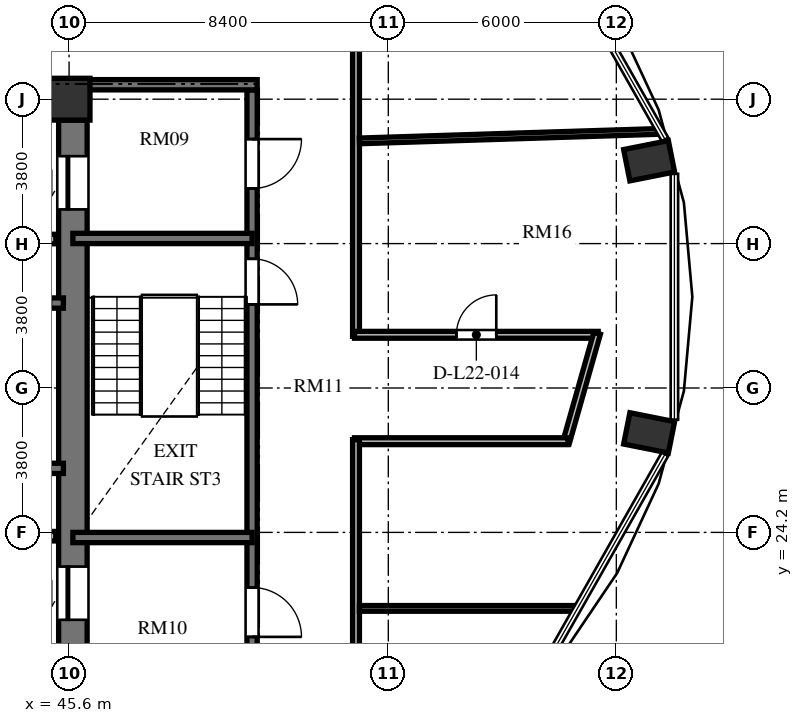
"""IFC4 building model, lengths in metres.
Left out: names, types, materials, properties, quantities, classifications, styles, units other than length and angle.
Written with IfcOpenShell. Run it as: python <this file> out.ifc"""

import sys

from ifc_helpers import new_model, si_unit, direction, frame, frame_2d, origin, origin_2d, place, context, subcontext, project, spatial, rectangle, extrude, element, fill, save


model = new_model("IFC4")
c1 = context("Model", 3, precision=1e-05, world=origin(), true_north=direction((0.0, 1.0)))
c2 = subcontext(c1, "Body", "Model", "MODEL_VIEW")
j1 = project(units=[si_unit("LENGTHUNIT", "METRE"), si_unit("PLANEANGLEUNIT", "RADIAN")], contexts=[c1])
p1 = place(None, origin())
s1 = spatial("IfcSite", under=j1, at=p1, CompositionType="ELEMENT")
p2 = place(p1, origin())
s2 = spatial("IfcBuilding", under=s1, at=p2, CompositionType="ELEMENT")
p3 = place(p2, frame((0.0, 0.0, 89.04)))
s3 = spatial("IfcBuildingStorey", under=s2, at=p3, CompositionType="ELEMENT", Elevation=89.04)
for number, where, z_axis, x_axis in (
    (1, (60.863, 26.82, 0.0), (0.0, 0.0, 1.0), (0.981, -0.195, 0.0)),
    (2, (60.863, 33.98, 0.0), (0.0, 0.0, 1.0), (0.981, 0.195, 0.0)),
):
    element("IfcColumn", number, at=place(p3, frame(where, z_axis=z_axis, x_axis=x_axis)), inside=s3, PredefinedType="COLUMN", context=c2, shape_type="SweptSolid", body=[
        extrude(rectangle(XDim=1.2, YDim=0.84, at=origin_2d()), origin(), (0.0, 0.0, 1.0), 3.648),
    ])
p4 = place(p3, frame((45.6, 35.6, 0.0), z_axis=(0.0, 0.0, 1.0), x_axis=(1.0, 0.0, 0.0)))
e3 = element("IfcColumn", 3, at=p4, inside=s3, PredefinedType="COLUMN", context=c2, shape_type="SweptSolid", body=[
    extrude(rectangle(XDim=1.1, YDim=1.1, at=origin_2d()), origin(), (0.0, 0.0, 1.0), 3.648),
])
p5 = place(p3, frame((45.7, 20.95, 0.0), z_axis=(0.0, 0.0, 1.0), x_axis=(0.0, 1.0, 0.0)))
e4 = element("IfcWall", 4, at=p5, inside=s3, PredefinedType="SHEAR", context=c2, shape_type="SweptSolid", body=[
    extrude(rectangle(XDim=14.1, YDim=0.75, at=frame_2d((7.05, 0.0))), origin(), (0.0, 0.0, 1.0), 3.648),
])
p6 = place(p5, frame((11.75, 0.0, 0.0)))
e5 = element("IfcOpeningElement", 5, at=p6, cuts=e4, PredefinedType="OPENING", context=c2, shape_type="SweptSolid", body=[
    extrude(rectangle(XDim=1.4, YDim=2.3, at=frame_2d((0.7, 1.15))), frame((0.0, 0.385, 0.0), z_axis=(0.0, -1.0, 0.0), x_axis=(1.0, 0.0, 0.0)), (0.0, 0.0, 1.0), 0.77),
])
p7 = place(p5, frame((0.95, 0.0, 0.0)))
e6 = element("IfcOpeningElement", 6, at=p7, cuts=e4, PredefinedType="OPENING", context=c2, shape_type="SweptSolid", body=[
    extrude(rectangle(XDim=1.4, YDim=2.3, at=frame_2d((0.7, 1.15))), frame((0.0, 0.385, 0.0), z_axis=(0.0, -1.0, 0.0), x_axis=(1.0, 0.0, 0.0)), (0.0, 0.0, 1.0), 0.77),
])
p8 = place(p3, frame((37.465, 30.235, 0.0), z_axis=(0.0, 0.0, 1.0), x_axis=(1.0, 0.0, 0.0)))
e7 = element("IfcWall", 7, at=p8, inside=s3, PredefinedType="SHEAR", context=c2, shape_type="SweptSolid", body=[
    extrude(rectangle(XDim=7.985, YDim=0.27, at=frame_2d((3.992, 0.0))), origin(), (0.0, 0.0, 1.0), 3.648),
])
p9 = place(p8, frame((6.455, 0.0, 0.0)))
e8 = element("IfcOpeningElement", 8, at=p9, cuts=e7, PredefinedType="OPENING", context=c2, shape_type="SweptSolid", body=[
    extrude(rectangle(XDim=1.2, YDim=2.15, at=frame_2d((0.6, 1.075))), frame((0.0, 0.145, 0.0), z_axis=(0.0, -1.0, 0.0), x_axis=(1.0, 0.0, 0.0)), (0.0, 0.0, 1.0), 0.29),
])
p10 = place(p3, frame((37.465, 25.885, 0.0), z_axis=(0.0, 0.0, 1.0), x_axis=(1.0, 0.0, 0.0)))
e9 = element("IfcWall", 9, at=p10, inside=s3, PredefinedType="SHEAR", context=c2, shape_type="SweptSolid", body=[
    extrude(rectangle(XDim=7.985, YDim=0.27, at=frame_2d((3.992, 0.0))), origin(), (0.0, 0.0, 1.0), 3.648),
])
for number, where, z_axis, x_axis in (
    (10, (42.95, 31.92, 0.0), (0.0, 0.0, 1.0), (1.0, 0.0, 0.0)),
    (11, (42.95, 24.1, 0.0), (0.0, 0.0, 1.0), (1.0, 0.0, 0.0)),
):
    element("IfcWall", number, at=place(p3, frame(where, z_axis=z_axis, x_axis=x_axis)), inside=s3, PredefinedType="SOLIDWALL", context=c2, shape_type="SweptSolid", body=[
        extrude(rectangle(XDim=2.3, YDim=0.25, at=frame_2d((1.15, 0.0))), origin(), (0.0, 0.0, 1.0), 3.428),
    ])
p11 = place(p3, frame((50.415, 35.845, 0.0), z_axis=(0.0, 0.0, 1.0), x_axis=(0.0, -1.0, 0.0)))
e12 = element("IfcWall", 12, at=p11, inside=s3, PredefinedType="SHEAR", context=c2, shape_type="SweptSolid", body=[
    extrude(rectangle(XDim=15.825, YDim=0.27, at=frame_2d((7.913, 0.0))), origin(), (0.0, 0.0, 1.0), 3.648),
])
p12 = place(p11, frame((4.445, 0.0, 0.0)))
e13 = element("IfcOpeningElement", 13, at=p12, cuts=e12, PredefinedType="OPENING", context=c2, shape_type="SweptSolid", body=[
    extrude(rectangle(XDim=1.2, YDim=2.15, at=frame_2d((0.6, 1.075))), frame((0.0, 0.145, 0.0), z_axis=(0.0, -1.0, 0.0), x_axis=(1.0, 0.0, 0.0)), (0.0, 0.0, 1.0), 0.29),
])
p13 = place(p11, frame((1.295, 0.0, 0.0)))
e14 = element("IfcOpeningElement", 14, at=p13, cuts=e12, PredefinedType="OPENING", context=c2, shape_type="SweptSolid", body=[
    extrude(rectangle(XDim=1.3, YDim=2.2, at=frame_2d((0.65, 1.1))), frame((0.0, 0.145, 0.0), z_axis=(0.0, -1.0, 0.0), x_axis=(1.0, 0.0, 0.0)), (0.0, 0.0, 1.0), 0.29),
])
p14 = place(p11, frame((13.095, 0.0, 0.0)))
e15 = element("IfcOpeningElement", 15, at=p14, cuts=e12, PredefinedType="OPENING", context=c2, shape_type="SweptSolid", body=[
    extrude(rectangle(XDim=1.3, YDim=2.2, at=frame_2d((0.65, 1.1))), frame((0.0, 0.145, 0.0), z_axis=(0.0, -1.0, 0.0), x_axis=(1.0, 0.0, 0.0)), (0.0, 0.0, 1.0), 0.29),
])
p15 = place(p3, frame((46.075, 35.98, 0.0), z_axis=(0.0, 0.0, 1.0), x_axis=(1.0, 0.0, 0.0)))
e16 = element("IfcWall", 16, at=p15, inside=s3, PredefinedType="SHEAR", context=c2, shape_type="SweptSolid", body=[
    extrude(rectangle(XDim=4.475, YDim=0.27, at=frame_2d((2.238, 0.0))), origin(), (0.0, 0.0, 1.0), 3.648),
])
for number, where, z_axis, x_axis in (
    (17, (45.7, 31.935, 0.0), (0.0, 0.0, 1.0), (1.0, 0.0, 0.0)),
    (18, (45.7, 24.065, 0.0), (0.0, 0.0, 1.0), (1.0, 0.0, 0.0)),
):
    element("IfcWall", number, at=place(p3, frame(where, z_axis=z_axis, x_axis=x_axis)), inside=s3, PredefinedType="SHEAR", context=c2, shape_type="SweptSolid", body=[
        extrude(rectangle(XDim=4.715, YDim=0.27, at=frame_2d((2.357, 0.0))), origin(), (0.0, 0.0, 1.0), 3.648),
    ])
p16 = place(p3, frame((53.15, 38.79, 0.0), z_axis=(0.0, 0.0, 1.0), x_axis=(0.0, -1.0, 0.0)))
e19 = element("IfcWall", 19, at=p16, inside=s3, PredefinedType="PARTITIONING", context=c2, shape_type="SweptSolid", body=[
    extrude(rectangle(XDim=9.43, YDim=0.18, at=frame_2d((4.715, 0.0))), origin(), (0.0, 0.0, 1.0), 3.428),
])
p17 = place(p3, frame((53.11, 29.4, 0.0), z_axis=(0.0, 0.0, 1.0), x_axis=(1.0, 0.0, 0.0)))
e20 = element("IfcWall", 20, at=p17, inside=s3, PredefinedType="PARTITIONING", context=c2, shape_type="SweptSolid", body=[
    extrude(rectangle(XDim=6.413, YDim=0.18, at=frame_2d((3.206, 0.0))), origin(), (0.0, 0.0, 1.0), 3.428),
])
p18 = place(p17, frame((2.681, 0.0, 0.0)))
e21 = element("IfcOpeningElement", 21, at=p18, cuts=e20, PredefinedType="OPENING", context=c2, shape_type="SweptSolid", body=[
    extrude(rectangle(XDim=1.05, YDim=2.15, at=frame_2d((0.525, 1.075))), frame((0.0, 0.1, 0.0), z_axis=(0.0, -1.0, 0.0), x_axis=(1.0, 0.0, 0.0)), (0.0, 0.0, 1.0), 0.2),
])
p19 = place(p3, frame((59.494, 29.438, 0.0), z_axis=(0.0, 0.0, 1.0), x_axis=(-0.273222154729, -0.961950962453, 0.0)))
e22 = element("IfcWall", 22, at=p19, inside=s3, PredefinedType="PARTITIONING", context=c2, shape_type="SweptSolid", body=[
    extrude(rectangle(XDim=2.991, YDim=0.18, at=frame_2d((1.495, 0.0))), origin(), (0.0, 0.0, 1.0), 3.428),
])
p20 = place(p3, frame((58.727, 26.6, 0.0), z_axis=(0.0, 0.0, 1.0), x_axis=(-1.0, 0.0, 0.0)))
e23 = element("IfcWall", 23, at=p20, inside=s3, PredefinedType="PARTITIONING", context=c2, shape_type="SweptSolid", body=[
    extrude(rectangle(XDim=5.617, YDim=0.18, at=frame_2d((2.809, 0.0))), origin(), (0.0, 0.0, 1.0), 3.428),
])
p21 = place(p3, frame((53.15, 26.64, 0.0), z_axis=(0.0, 0.0, 1.0), x_axis=(0.0, -1.0, 0.0)))
e24 = element("IfcWall", 24, at=p21, inside=s3, PredefinedType="PARTITIONING", context=c2, shape_type="SweptSolid", body=[
    extrude(rectangle(XDim=6.66, YDim=0.18, at=frame_2d((3.33, 0.0))), origin(), (0.0, 0.0, 1.0), 3.428),
])
p22 = place(p3, frame((53.24, 22.2, 0.0), z_axis=(0.0, 0.0, 1.0), x_axis=(1.0, 0.0, 0.0)))
e25 = element("IfcWall", 25, at=p22, inside=s3, PredefinedType="PARTITIONING", context=c2, shape_type="SweptSolid", body=[
    extrude(rectangle(XDim=5.731, YDim=0.15, at=frame_2d((2.866, 0.0))), origin(), (0.0, 0.0, 1.0), 3.428),
])
p23 = place(p3, frame((53.24, 34.502, 0.0), z_axis=(0.0, 0.0, 1.0), x_axis=(0.999499445349, 0.031636351679, 0.0)))
e26 = element("IfcWall", 26, at=p23, inside=s3, PredefinedType="PARTITIONING", context=c2, shape_type="SweptSolid", body=[
    extrude(rectangle(XDim=7.933, YDim=0.15, at=frame_2d((3.967, 0.0))), origin(), (0.0, 0.0, 1.0), 2.813),
])
p24 = place(p6, origin())
e27 = element("IfcDoor", 27, at=p24, inside=s3, OperationType="SLIDING_TO_LEFT", PredefinedType="DOOR", context=c2, shape_type="SweptSolid", body=[
    extrude(rectangle(XDim=1.4, YDim=2.3, at=frame_2d((0.7, 1.15))), frame((0.0, 0.025, 0.0), z_axis=(0.0, -1.0, 0.0), x_axis=(1.0, 0.0, 0.0)), (0.0, 0.0, 1.0), 0.05),
])
fill(e5, e27)
p25 = place(p7, origin())
e28 = element("IfcDoor", 28, at=p25, inside=s3, OperationType="SLIDING_TO_LEFT", PredefinedType="DOOR", context=c2, shape_type="SweptSolid", body=[
    extrude(rectangle(XDim=1.4, YDim=2.3, at=frame_2d((0.7, 1.15))), frame((0.0, 0.025, 0.0), z_axis=(0.0, -1.0, 0.0), x_axis=(1.0, 0.0, 0.0)), (0.0, 0.0, 1.0), 0.05),
])
fill(e6, e28)
p26 = place(p12, origin())
e29 = element("IfcDoor", 29, at=p26, inside=s3, OperationType="SINGLE_SWING_RIGHT", PredefinedType="DOOR", context=c2, shape_type="SweptSolid", body=[
    extrude(rectangle(XDim=1.2, YDim=2.15, at=frame_2d((0.6, 1.075))), frame((0.0, 0.025, 0.0), z_axis=(0.0, -1.0, 0.0), x_axis=(1.0, 0.0, 0.0)), (0.0, 0.0, 1.0), 0.05),
])
fill(e13, e29)
p27 = place(p13, origin())
e30 = element("IfcDoor", 30, at=p27, inside=s3, OperationType="SINGLE_SWING_LEFT", PredefinedType="DOOR", context=c2, shape_type="SweptSolid", body=[
    extrude(rectangle(XDim=1.3, YDim=2.2, at=frame_2d((0.65, 1.1))), frame((0.0, 0.025, 0.0), z_axis=(0.0, -1.0, 0.0), x_axis=(1.0, 0.0, 0.0)), (0.0, 0.0, 1.0), 0.05),
])
fill(e14, e30)
p28 = place(p14, origin())
e31 = element("IfcDoor", 31, at=p28, inside=s3, OperationType="SINGLE_SWING_RIGHT", PredefinedType="DOOR", context=c2, shape_type="SweptSolid", body=[
    extrude(rectangle(XDim=1.3, YDim=2.2, at=frame_2d((0.65, 1.1))), frame((0.0, 0.025, 0.0), z_axis=(0.0, -1.0, 0.0), x_axis=(1.0, 0.0, 0.0)), (0.0, 0.0, 1.0), 0.05),
])
fill(e15, e31)
p29 = place(p18, origin())
e32 = element("IfcDoor", 32, at=p29, inside=s3, OperationType="SINGLE_SWING_RIGHT", PredefinedType="DOOR", context=c2, shape_type="SweptSolid", body=[
    extrude(rectangle(XDim=1.05, YDim=2.15, at=frame_2d((0.525, 1.075))), frame((0.0, 0.025, 0.0), z_axis=(0.0, -1.0, 0.0), x_axis=(1.0, 0.0, 0.0)), (0.0, 0.0, 1.0), 0.05),
])
fill(e21, e32)
save(model, sys.argv[1])
